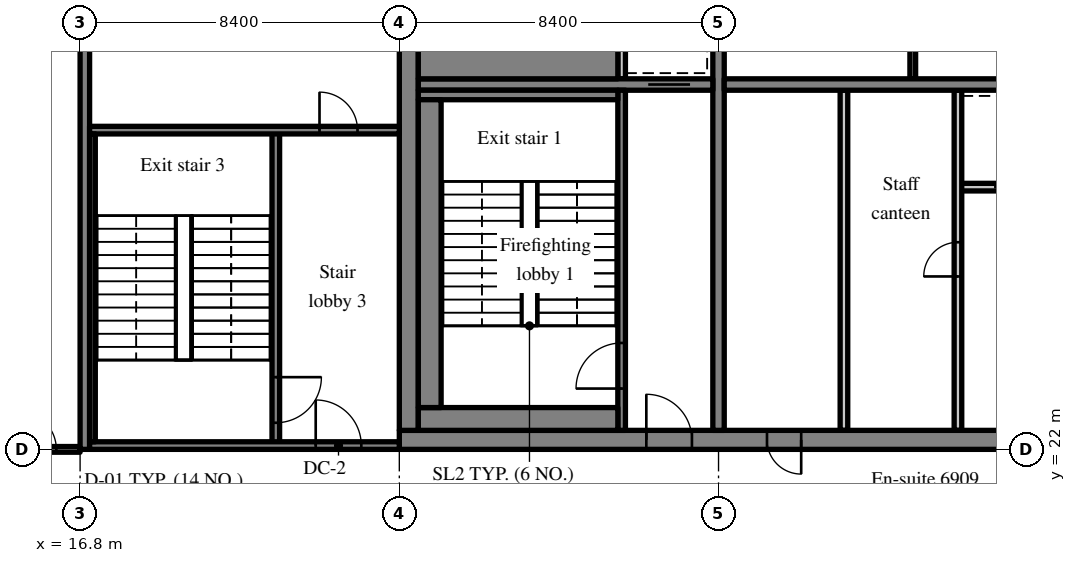
"""IFC4 building model, lengths in metres.
Left out: names, types, materials, properties, quantities, classifications, styles, units other than length and angle.
Written with IfcOpenShell. Run it as: python <this file> out.ifc"""

import sys

from ifc_helpers import new_model, si_unit, direction, frame, frame_2d, origin, place, context, subcontext, project, spatial, rectangle, extrude, source, transform, mapped, element, fill, save


model = new_model("IFC4")
c1 = context("Model", 3, precision=1e-05, world=origin(), true_north=direction((0.0, 1.0)))
c2 = subcontext(c1, "Body", "Model", "MODEL_VIEW")
j1 = project(units=[si_unit("LENGTHUNIT", "METRE"), si_unit("PLANEANGLEUNIT", "RADIAN")], contexts=[c1])
p1 = place(None, origin())
s1 = spatial("IfcSite", under=j1, at=p1, CompositionType="ELEMENT")
p2 = place(p1, origin())
s2 = spatial("IfcBuilding", under=s1, at=p2, CompositionType="ELEMENT")
p3 = place(p2, frame((0.0, 0.0, 289.7)))
s3 = spatial("IfcBuildingStorey", under=s2, at=p3, CompositionType="ELEMENT", Elevation=289.7)
m1 = source(origin(), c2, "Body", "SweptSolid", [
    extrude(rectangle(XDim=50.4, YDim=0.5, at=frame_2d((25.2, 0.0))), origin(), (0.0, 0.0, 1.0), 3.72),
])
p4 = place(p3, frame((25.2, 22.25, 0.0), z_axis=(0.0, 0.0, 1.0), x_axis=(1.0, 0.0, 0.0)))
e1 = element("IfcWall", 1, at=p4, inside=s3, PredefinedType="SHEAR", context=c2, shape_type="MappedRepresentation", body=[
    mapped(m1, transform((0.0, 0.0, 0.0), scale=1.0)),
])
m2 = source(origin(), c2, "Body", "SweptSolid", [
    extrude(rectangle(XDim=1.8, YDim=2.1, at=frame_2d((0.9, 1.05))), frame((0.0, 0.26, 0.0), z_axis=(0.0, -1.0, 0.0), x_axis=(1.0, 0.0, 0.0)), (0.0, 0.0, 1.0), 0.52),
])
p5 = place(p4, frame((15.9, 0.0, 0.0)))
e2 = element("IfcOpeningElement", 2, at=p5, cuts=e1, PredefinedType="OPENING", context=c2, shape_type="MappedRepresentation", body=[
    mapped(m2, transform((0.0, 0.0, 0.0), scale=1.0)),
])
m3 = source(origin(), c2, "Body", "SweptSolid", [
    extrude(rectangle(XDim=0.9, YDim=2.1, at=frame_2d((0.45, 1.05))), frame((0.0, 0.26, 0.0), z_axis=(0.0, -1.0, 0.0), x_axis=(1.0, 0.0, 0.0)), (0.0, 0.0, 1.0), 0.52),
])
p6 = place(p4, frame((9.675, 0.0, 0.0)))
e3 = element("IfcOpeningElement", 3, at=p6, cuts=e1, PredefinedType="OPENING", context=c2, shape_type="MappedRepresentation", body=[
    mapped(m3, transform((0.0, 0.0, 0.0), scale=1.0)),
])
p7 = place(p4, frame((21.525, 0.0, 0.0)))
e4 = element("IfcOpeningElement", 4, at=p7, cuts=e1, PredefinedType="OPENING", context=c2, shape_type="MappedRepresentation", body=[
    mapped(m3, transform((0.0, 0.0, 0.0), scale=1.0)),
])
p8 = place(p4, frame((32.7, 0.0, 0.0)))
e5 = element("IfcOpeningElement", 5, at=p8, cuts=e1, PredefinedType="OPENING", context=c2, shape_type="MappedRepresentation", body=[
    mapped(m2, transform((0.0, 0.0, 0.0), scale=1.0)),
])
m4 = source(origin(), c2, "Body", "SweptSolid", [
    extrude(rectangle(XDim=1.2, YDim=2.1, at=frame_2d((0.6, 1.05))), frame((0.0, 0.26, 0.0), z_axis=(0.0, -1.0, 0.0), x_axis=(1.0, 0.0, 0.0)), (0.0, 0.0, 1.0), 0.52),
])
p9 = place(p4, frame((6.5, 0.0, 0.0)))
e6 = element("IfcOpeningElement", 6, at=p9, cuts=e1, PredefinedType="OPENING", context=c2, shape_type="MappedRepresentation", body=[
    mapped(m4, transform((0.0, 0.0, 0.0), scale=1.0)),
])
p10 = place(p4, frame((47.975, 0.0, 0.0)))
e7 = element("IfcOpeningElement", 7, at=p10, cuts=e1, PredefinedType="OPENING", context=c2, shape_type="MappedRepresentation", body=[
    mapped(m4, transform((0.0, 0.0, 0.0), scale=1.0)),
])
m5 = source(origin(), c2, "Body", "SweptSolid", [
    extrude(rectangle(XDim=19.0, YDim=0.5, at=frame_2d((9.5, 0.0))), origin(), (0.0, 0.0, 1.0), 3.72),
])
p11 = place(p3, frame((25.45, 22.5, 0.0), z_axis=(0.0, 0.0, 1.0), x_axis=(0.0, 1.0, 0.0)))
e8 = element("IfcWall", 8, at=p11, inside=s3, PredefinedType="SHEAR", context=c2, shape_type="MappedRepresentation", body=[
    mapped(m5, transform((0.0, 0.0, 0.0), scale=1.0)),
])
m6 = source(origin(), c2, "Body", "SweptSolid", [
    extrude(rectangle(XDim=19.0, YDim=0.3, at=frame_2d((9.5, 0.0))), origin(), (0.0, 0.0, 1.0), 3.72),
])
p12 = place(p3, frame((33.6, 22.5, 0.0), z_axis=(0.0, 0.0, 1.0), x_axis=(0.0, 1.0, 0.0)))
e9 = element("IfcWall", 9, at=p12, inside=s3, PredefinedType="SHEAR", context=c2, shape_type="MappedRepresentation", body=[
    mapped(m6, transform((0.0, 0.0, 0.0), scale=1.0)),
])
m7 = source(origin(), c2, "Body", "SweptSolid", [
    extrude(rectangle(XDim=1.1, YDim=2.1, at=frame_2d((0.55, 1.05))), frame((0.0, 0.16, 0.0), z_axis=(0.0, -1.0, 0.0), x_axis=(1.0, 0.0, 0.0)), (0.0, 0.0, 1.0), 0.32),
])
p13 = place(p12, frame((12.95, 0.0, 0.0)))
e10 = element("IfcOpeningElement", 10, at=p13, cuts=e9, PredefinedType="OPENING", context=c2, shape_type="MappedRepresentation", body=[
    mapped(m7, transform((0.0, 0.0, 0.0), scale=1.0)),
])
m8 = source(origin(), c2, "Body", "SweptSolid", [
    extrude(rectangle(XDim=7.75, YDim=0.3, at=frame_2d((3.875, 0.0))), origin(), (0.0, 0.0, 1.0), 3.72),
])
p14 = place(p3, frame((25.7, 31.6, 0.0), z_axis=(0.0, 0.0, 1.0), x_axis=(1.0, 0.0, 0.0)))
e11 = element("IfcWall", 11, at=p14, inside=s3, PredefinedType="SHEAR", context=c2, shape_type="MappedRepresentation", body=[
    mapped(m8, transform((0.0, 0.0, 0.0), scale=1.0)),
])
p15 = place(p14, frame((6.05, 0.0, 0.0)))
e12 = element("IfcOpeningElement", 12, at=p15, cuts=e11, PredefinedType="OPENING", context=c2, shape_type="MappedRepresentation", body=[
    mapped(m7, transform((0.0, 0.0, 0.0), scale=1.0)),
])
m9 = source(origin(), c2, "Body", "SweptSolid", [
    extrude(rectangle(XDim=16.5, YDim=0.3, at=frame_2d((8.25, 0.0))), origin(), (0.0, 0.0, 1.0), 3.72),
])
p16 = place(p3, frame((33.75, 31.6, 0.0), z_axis=(0.0, 0.0, 1.0), x_axis=(1.0, 0.0, 0.0)))
e13 = element("IfcWall", 13, at=p16, inside=s3, PredefinedType="SHEAR", context=c2, shape_type="MappedRepresentation", body=[
    mapped(m9, transform((0.0, 0.0, 0.0), scale=1.0)),
])
m10 = source(origin(), c2, "Body", "SweptSolid", [
    extrude(rectangle(XDim=1.0, YDim=2.1, at=frame_2d((0.5, 1.05))), frame((0.0, 0.16, 0.0), z_axis=(0.0, -1.0, 0.0), x_axis=(1.0, 0.0, 0.0)), (0.0, 0.0, 1.0), 0.32),
])
p17 = place(p16, frame((14.875, 0.0, 0.0)))
e14 = element("IfcOpeningElement", 14, at=p17, cuts=e13, PredefinedType="OPENING", context=c2, shape_type="MappedRepresentation", body=[
    mapped(m10, transform((0.0, 0.0, 0.0), scale=1.0)),
])
m11 = source(origin(), c2, "Body", "SweptSolid", [
    extrude(rectangle(XDim=18.4, YDim=0.25, at=frame_2d((9.2, 0.0))), origin(), (0.0, 0.0, 1.0), 3.72),
])
p18 = place(p3, frame((16.925, 22.0, 0.0), z_axis=(0.0, 0.0, 1.0), x_axis=(0.0, 1.0, 0.0)))
e15 = element("IfcWall", 15, at=p18, inside=s3, PredefinedType="SHEAR", context=c2, shape_type="MappedRepresentation", body=[
    mapped(m11, transform((0.0, 0.0, 0.0), scale=1.0)),
])
m12 = source(origin(), c2, "Body", "SweptSolid", [
    extrude(rectangle(XDim=6.0, YDim=0.2, at=frame_2d((3.0, 0.0))), origin(), (0.0, 0.0, 1.0), 3.72),
])
p19 = place(p3, frame((39.9, 28.9, 0.0), z_axis=(0.0, 0.0, 1.0), x_axis=(1.0, 0.0, 0.0)))
e16 = element("IfcWall", 16, at=p19, inside=s3, PredefinedType="SOLIDWALL", context=c2, shape_type="MappedRepresentation", body=[
    mapped(m12, transform((0.0, 0.0, 0.0), scale=1.0)),
])
m13 = source(origin(), c2, "Body", "SweptSolid", [
    extrude(rectangle(XDim=1.1, YDim=2.1, at=frame_2d((0.55, 1.05))), frame((0.0, 0.11, 0.0), z_axis=(0.0, -1.0, 0.0), x_axis=(1.0, 0.0, 0.0)), (0.0, 0.0, 1.0), 0.22),
])
p20 = place(p19, frame((0.95, 0.0, 0.0)))
e17 = element("IfcOpeningElement", 17, at=p20, cuts=e16, PredefinedType="OPENING", context=c2, shape_type="MappedRepresentation", body=[
    mapped(m13, transform((0.0, 0.0, 0.0), scale=1.0)),
])
p21 = place(p19, frame((3.95, 0.0, 0.0)))
e18 = element("IfcOpeningElement", 18, at=p21, cuts=e16, PredefinedType="OPENING", context=c2, shape_type="MappedRepresentation", body=[
    mapped(m13, transform((0.0, 0.0, 0.0), scale=1.0)),
])
m14 = source(origin(), c2, "Body", "SweptSolid", [
    extrude(rectangle(XDim=8.95, YDim=0.2, at=frame_2d((4.475, 0.0))), origin(), (0.0, 0.0, 1.0), 3.72),
])
p22 = place(p3, frame((39.9, 22.5, 0.0), z_axis=(0.0, 0.0, 1.0), x_axis=(0.0, 1.0, 0.0)))
e19 = element("IfcWall", 19, at=p22, inside=s3, PredefinedType="PARTITIONING", context=c2, shape_type="MappedRepresentation", body=[
    mapped(m14, transform((0.0, 0.0, 0.0), scale=1.0)),
])
m15 = source(origin(), c2, "Body", "SweptSolid", [
    extrude(rectangle(XDim=0.9, YDim=2.1, at=frame_2d((0.45, 1.05))), frame((0.0, 0.11, 0.0), z_axis=(0.0, -1.0, 0.0), x_axis=(1.0, 0.0, 0.0)), (0.0, 0.0, 1.0), 0.22),
])
p23 = place(p22, frame((4.05, 0.0, 0.0)))
e20 = element("IfcOpeningElement", 20, at=p23, cuts=e19, PredefinedType="OPENING", context=c2, shape_type="MappedRepresentation", body=[
    mapped(m15, transform((0.0, 0.0, 0.0), scale=1.0)),
])
p24 = place(p3, frame((36.9, 22.5, 0.0), z_axis=(0.0, 0.0, 1.0), x_axis=(0.0, 1.0, 0.0)))
e21 = element("IfcWall", 21, at=p24, inside=s3, PredefinedType="PARTITIONING", context=c2, shape_type="MappedRepresentation", body=[
    mapped(m14, transform((0.0, 0.0, 0.0), scale=1.0)),
])
m16 = source(origin(), c2, "Body", "SweptSolid", [
    extrude(rectangle(XDim=3.25, YDim=0.15, at=frame_2d((1.625, 0.0))), origin(), (0.0, 0.0, 1.0), 3.72),
])
p25 = place(p3, frame((38.711, 31.75, 0.0), z_axis=(0.0, 0.0, 1.0), x_axis=(0.0, 1.0, 0.0)))
e22 = element("IfcWall", 22, at=p25, inside=s3, PredefinedType="PARTITIONING", context=c2, shape_type="MappedRepresentation", body=[
    mapped(m16, transform((0.0, 0.0, 0.0), scale=1.0)),
])
m17 = source(origin(), c2, "Body", "SweptSolid", [
    extrude(rectangle(XDim=8.95, YDim=0.2, at=frame_2d((4.475, 0.0))), origin(), (0.0, 0.0, 1.0), 3.72),
])
p26 = place(p3, frame((31.05, 22.5, 0.0), z_axis=(0.0, 0.0, 1.0), x_axis=(0.0, 1.0, 0.0)))
e23 = element("IfcWall", 23, at=p26, inside=s3, PredefinedType="SOLIDWALL", context=c2, shape_type="MappedRepresentation", body=[
    mapped(m17, transform((0.0, 0.0, 0.0), scale=1.0)),
])
m18 = source(origin(), c2, "Body", "SweptSolid", [
    extrude(rectangle(XDim=1.2, YDim=2.1, at=frame_2d((0.6, 1.05))), frame((0.0, 0.11, 0.0), z_axis=(0.0, -1.0, 0.0), x_axis=(1.0, 0.0, 0.0)), (0.0, 0.0, 1.0), 0.22),
])
p27 = place(p26, frame((1.1, 0.0, 0.0)))
e24 = element("IfcOpeningElement", 24, at=p27, cuts=e23, PredefinedType="OPENING", context=c2, shape_type="MappedRepresentation", body=[
    mapped(m18, transform((0.0, 0.0, 0.0), scale=1.0)),
])
m19 = source(origin(), c2, "Body", "SweptSolid", [
    extrude(rectangle(XDim=1.85, YDim=0.2, at=frame_2d((0.925, 0.0))), origin(), (0.0, 0.0, 1.0), 3.72),
])
p28 = place(p3, frame((31.05, 31.75, 0.0), z_axis=(0.0, 0.0, 1.0), x_axis=(0.0, 1.0, 0.0)))
e25 = element("IfcWall", 25, at=p28, inside=s3, PredefinedType="SOLIDWALL", context=c2, shape_type="MappedRepresentation", body=[
    mapped(m19, transform((0.0, 0.0, 0.0), scale=1.0)),
])
m20 = source(origin(), c2, "Body", "SweptSolid", [
    extrude(rectangle(XDim=8.3, YDim=0.2, at=frame_2d((4.15, 0.0))), origin(), (0.0, 0.0, 1.0), 3.72),
])
p29 = place(p3, frame((21.95, 22.1, 0.0), z_axis=(0.0, 0.0, 1.0), x_axis=(0.0, 1.0, 0.0)))
e26 = element("IfcWall", 26, at=p29, inside=s3, PredefinedType="SOLIDWALL", context=c2, shape_type="MappedRepresentation", body=[
    mapped(m20, transform((0.0, 0.0, 0.0), scale=1.0)),
])
p30 = place(p29, frame((0.6, 0.0, 0.0)))
e27 = element("IfcOpeningElement", 27, at=p30, cuts=e26, PredefinedType="OPENING", context=c2, shape_type="MappedRepresentation", body=[
    mapped(m18, transform((0.0, 0.0, 0.0), scale=1.0)),
])
m21 = source(origin(), c2, "Body", "SweptSolid", [
    extrude(rectangle(XDim=8.15, YDim=0.2, at=frame_2d((4.075, 0.0))), origin(), (0.0, 0.0, 1.0), 3.72),
])
p31 = place(p3, frame((17.05, 22.1, 0.0), z_axis=(0.0, 0.0, 1.0), x_axis=(1.0, 0.0, 0.0)))
e28 = element("IfcWall", 28, at=p31, inside=s3, PredefinedType="SOLIDWALL", context=c2, shape_type="MappedRepresentation", body=[
    mapped(m21, transform((0.0, 0.0, 0.0), scale=1.0)),
])
p32 = place(p31, frame((5.95, 0.0, 0.0)))
e29 = element("IfcOpeningElement", 29, at=p32, cuts=e28, PredefinedType="OPENING", context=c2, shape_type="MappedRepresentation", body=[
    mapped(m18, transform((0.0, 0.0, 0.0), scale=1.0)),
])
p33 = place(p3, frame((17.05, 30.4, 0.0), z_axis=(0.0, 0.0, 1.0), x_axis=(1.0, 0.0, 0.0)))
e30 = element("IfcWall", 30, at=p33, inside=s3, PredefinedType="SOLIDWALL", context=c2, shape_type="MappedRepresentation", body=[
    mapped(m21, transform((0.0, 0.0, 0.0), scale=1.0)),
])
m22 = source(origin(), c2, "Body", "SweptSolid", [
    extrude(rectangle(XDim=1.0, YDim=2.1, at=frame_2d((0.5, 1.05))), frame((0.0, 0.11, 0.0), z_axis=(0.0, -1.0, 0.0), x_axis=(1.0, 0.0, 0.0)), (0.0, 0.0, 1.0), 0.22),
])
p34 = place(p33, frame((6.05, 0.0, 0.0)))
e31 = element("IfcOpeningElement", 31, at=p34, cuts=e30, PredefinedType="OPENING", context=c2, shape_type="MappedRepresentation", body=[
    mapped(m22, transform((0.0, 0.0, 0.0), scale=1.0)),
])
m23 = source(origin(), c2, "Body", "SweptSolid", [
    extrude(rectangle(XDim=5.25, YDim=0.6, at=frame_2d((2.625, 0.0))), origin(), (0.0, 0.0, 1.0), 3.72),
])
p35 = place(p3, frame((25.7, 22.8, 0.0), z_axis=(0.0, 0.0, 1.0), x_axis=(1.0, 0.0, 0.0)))
e32 = element("IfcWall", 32, at=p35, inside=s3, PredefinedType="SOLIDWALL", context=c2, shape_type="MappedRepresentation", body=[
    mapped(m23, transform((0.0, 0.0, 0.0), scale=1.0)),
])
m24 = source(origin(), c2, "Body", "SweptSolid", [
    extrude(rectangle(XDim=5.25, YDim=0.25, at=frame_2d((2.625, 0.0))), origin(), (0.0, 0.0, 1.0), 3.72),
])
p36 = place(p3, frame((25.7, 31.325, 0.0), z_axis=(0.0, 0.0, 1.0), x_axis=(1.0, 0.0, 0.0)))
e33 = element("IfcWall", 33, at=p36, inside=s3, PredefinedType="SOLIDWALL", context=c2, shape_type="MappedRepresentation", body=[
    mapped(m24, transform((0.0, 0.0, 0.0), scale=1.0)),
])
m25 = source(origin(), c2, "Body", "SweptSolid", [
    extrude(rectangle(XDim=8.1, YDim=0.6, at=frame_2d((4.05, 0.0))), origin(), (0.0, 0.0, 1.0), 3.72),
])
p37 = place(p3, frame((26.0, 23.1, 0.0), z_axis=(0.0, 0.0, 1.0), x_axis=(0.0, 1.0, 0.0)))
e34 = element("IfcWall", 34, at=p37, inside=s3, PredefinedType="SOLIDWALL", context=c2, shape_type="MappedRepresentation", body=[
    mapped(m25, transform((0.0, 0.0, 0.0), scale=1.0)),
])
m26 = source(origin(), c2, "Body", "SweptSolid", [
    extrude(rectangle(XDim=8.1, YDim=0.15, at=frame_2d((4.05, 0.0))), origin(), (0.0, 0.0, 1.0), 3.72),
])
p38 = place(p3, frame((17.125, 22.2, 0.0), z_axis=(0.0, 0.0, 1.0), x_axis=(0.0, 1.0, 0.0)))
e35 = element("IfcWall", 35, at=p38, inside=s3, PredefinedType="SOLIDWALL", context=c2, shape_type="MappedRepresentation", body=[
    mapped(m26, transform((0.0, 0.0, 0.0), scale=1.0)),
])
m27 = source(origin(), c2, "Body", "SweptSolid", [
    extrude(rectangle(XDim=5.25, YDim=1.05, at=frame_2d((2.625, 0.0))), origin(), (0.0, 0.0, 1.0), 3.72),
])
p39 = place(p3, frame((25.7, 32.275, 0.0), z_axis=(0.0, 0.0, 1.0), x_axis=(1.0, 0.0, 0.0)))
e36 = element("IfcWall", 36, at=p39, inside=s3, PredefinedType="SOLIDWALL", context=c2, shape_type="MappedRepresentation", body=[
    mapped(m27, transform((0.0, 0.0, 0.0), scale=1.0)),
])
m28 = source(origin(), c2, "Body", "SweptSolid", [
    extrude(rectangle(XDim=1.9, YDim=0.15, at=frame_2d((0.95, 0.0))), origin(), (0.0, 0.0, 1.0), 3.02),
])
p40 = place(p3, frame((14.9, 22.0, 0.0), z_axis=(0.0, 0.0, 1.0), x_axis=(1.0, 0.0, 0.0)))
e37 = element("IfcWall", 37, at=p40, inside=s3, PredefinedType="PARTITIONING", context=c2, shape_type="MappedRepresentation", body=[
    mapped(m28, transform((0.0, 0.0, 0.0), scale=1.0)),
])
m29 = source(origin(), c2, "Body", "SweptSolid", [
    extrude(rectangle(XDim=1.0, YDim=2.1, at=frame_2d((0.5, 1.05))), frame((0.0, 0.085, 0.0), z_axis=(0.0, -1.0, 0.0), x_axis=(1.0, 0.0, 0.0)), (0.0, 0.0, 1.0), 0.17),
])
p41 = place(p40, frame((0.275, 0.0, 0.0)))
e38 = element("IfcOpeningElement", 38, at=p41, cuts=e37, PredefinedType="OPENING", context=c2, shape_type="MappedRepresentation", body=[
    mapped(m29, transform((0.0, 0.0, 0.0), scale=1.0)),
])
m30 = source(origin(), c2, "Body", "SweptSolid", [
    extrude(rectangle(XDim=1.1, YDim=2.1, at=frame_2d((0.55, 1.05))), frame((0.0, 0.025, 0.0), z_axis=(0.0, -1.0, 0.0), x_axis=(1.0, 0.0, 0.0)), (0.0, 0.0, 1.0), 0.05),
])
p42 = place(p20, origin())
e39 = element("IfcDoor", 39, at=p42, inside=s3, OperationType="SLIDING_TO_LEFT", PredefinedType="DOOR", context=c2, shape_type="MappedRepresentation", body=[
    mapped(m30, transform((0.0, 0.0, 0.0), scale=1.0)),
])
fill(e17, e39)
m31 = source(origin(), c2, "Body", "SweptSolid", [
    extrude(rectangle(XDim=0.9, YDim=2.1, at=frame_2d((0.45, 1.05))), frame((0.0, 0.175, 0.0), z_axis=(0.0, -1.0, 0.0), x_axis=(1.0, 0.0, 0.0)), (0.0, 0.0, 1.0), 0.05),
])
p43 = place(p6, origin())
e40 = element("IfcDoor", 40, at=p43, inside=s3, OperationType="SINGLE_SWING_RIGHT", PredefinedType="DOOR", context=c2, shape_type="MappedRepresentation", body=[
    mapped(m31, transform((0.0, 0.0, 0.0), scale=1.0)),
])
fill(e3, e40)
m32 = source(origin(), c2, "Body", "SweptSolid", [
    extrude(rectangle(XDim=0.9, YDim=2.1, at=frame_2d((0.45, 1.05))), frame((0.0, 0.025, 0.0), z_axis=(0.0, -1.0, 0.0), x_axis=(1.0, 0.0, 0.0)), (0.0, 0.0, 1.0), 0.05),
])
p44 = place(p23, origin())
e41 = element("IfcDoor", 41, at=p44, inside=s3, OperationType="SINGLE_SWING_LEFT", PredefinedType="DOOR", context=c2, shape_type="MappedRepresentation", body=[
    mapped(m32, transform((0.0, 0.0, 0.0), scale=1.0)),
])
fill(e20, e41)
m33 = source(origin(), c2, "Body", "SweptSolid", [
    extrude(rectangle(XDim=1.2, YDim=2.1, at=frame_2d((0.6, 1.05))), frame((0.0, 0.025, 0.0), z_axis=(0.0, -1.0, 0.0), x_axis=(1.0, 0.0, 0.0)), (0.0, 0.0, 1.0), 0.05),
])
p45 = place(p27, origin())
e42 = element("IfcDoor", 42, at=p45, inside=s3, OperationType="SINGLE_SWING_LEFT", PredefinedType="DOOR", context=c2, shape_type="MappedRepresentation", body=[
    mapped(m33, transform((0.0, 0.0, 0.0), scale=1.0)),
])
fill(e24, e42)
m34 = source(origin(), c2, "Body", "SweptSolid", [
    extrude(rectangle(XDim=1.2, YDim=2.1, at=frame_2d((0.6, 1.05))), frame((0.0, 0.175, 0.0), z_axis=(0.0, -1.0, 0.0), x_axis=(1.0, 0.0, 0.0)), (0.0, 0.0, 1.0), 0.05),
])
p46 = place(p9, origin())
e43 = element("IfcDoor", 43, at=p46, inside=s3, OperationType="SINGLE_SWING_LEFT", PredefinedType="DOOR", context=c2, shape_type="MappedRepresentation", body=[
    mapped(m34, transform((0.0, 0.0, 0.0), scale=1.0)),
])
fill(e6, e43)
p47 = place(p15, origin())
e44 = element("IfcDoor", 44, at=p47, inside=s3, OperationType="SLIDING_TO_LEFT", PredefinedType="DOOR", context=c2, shape_type="MappedRepresentation", body=[
    mapped(m30, transform((0.0, 0.0, 0.0), scale=1.0)),
])
fill(e12, e44)
p48 = place(p30, origin())
e45 = element("IfcDoor", 45, at=p48, inside=s3, OperationType="SINGLE_SWING_RIGHT", PredefinedType="DOOR", context=c2, shape_type="MappedRepresentation", body=[
    mapped(m33, transform((0.0, 0.0, 0.0), scale=1.0)),
])
fill(e27, e45)
p49 = place(p32, origin())
e46 = element("IfcDoor", 46, at=p49, inside=s3, OperationType="SINGLE_SWING_LEFT", PredefinedType="DOOR", context=c2, shape_type="MappedRepresentation", body=[
    mapped(m33, transform((0.0, 0.0, 0.0), scale=1.0)),
])
fill(e29, e46)
m35 = source(origin(), c2, "Body", "SweptSolid", [
    extrude(rectangle(XDim=1.0, YDim=2.1, at=frame_2d((0.5, 1.05))), frame((0.0, 0.025, 0.0), z_axis=(0.0, -1.0, 0.0), x_axis=(1.0, 0.0, 0.0)), (0.0, 0.0, 1.0), 0.05),
])
p50 = place(p34, origin())
e47 = element("IfcDoor", 47, at=p50, inside=s3, OperationType="SINGLE_SWING_LEFT", PredefinedType="DOOR", context=c2, shape_type="MappedRepresentation", body=[
    mapped(m35, transform((0.0, 0.0, 0.0), scale=1.0)),
])
fill(e31, e47)
p51 = place(p41, origin())
e48 = element("IfcDoor", 48, at=p51, inside=s3, OperationType="SINGLE_SWING_LEFT", PredefinedType="DOOR", context=c2, shape_type="MappedRepresentation", body=[
    mapped(m35, transform((0.0, 0.0, 0.0), scale=1.0)),
])
fill(e38, e48)
save(model, sys.argv[1])
